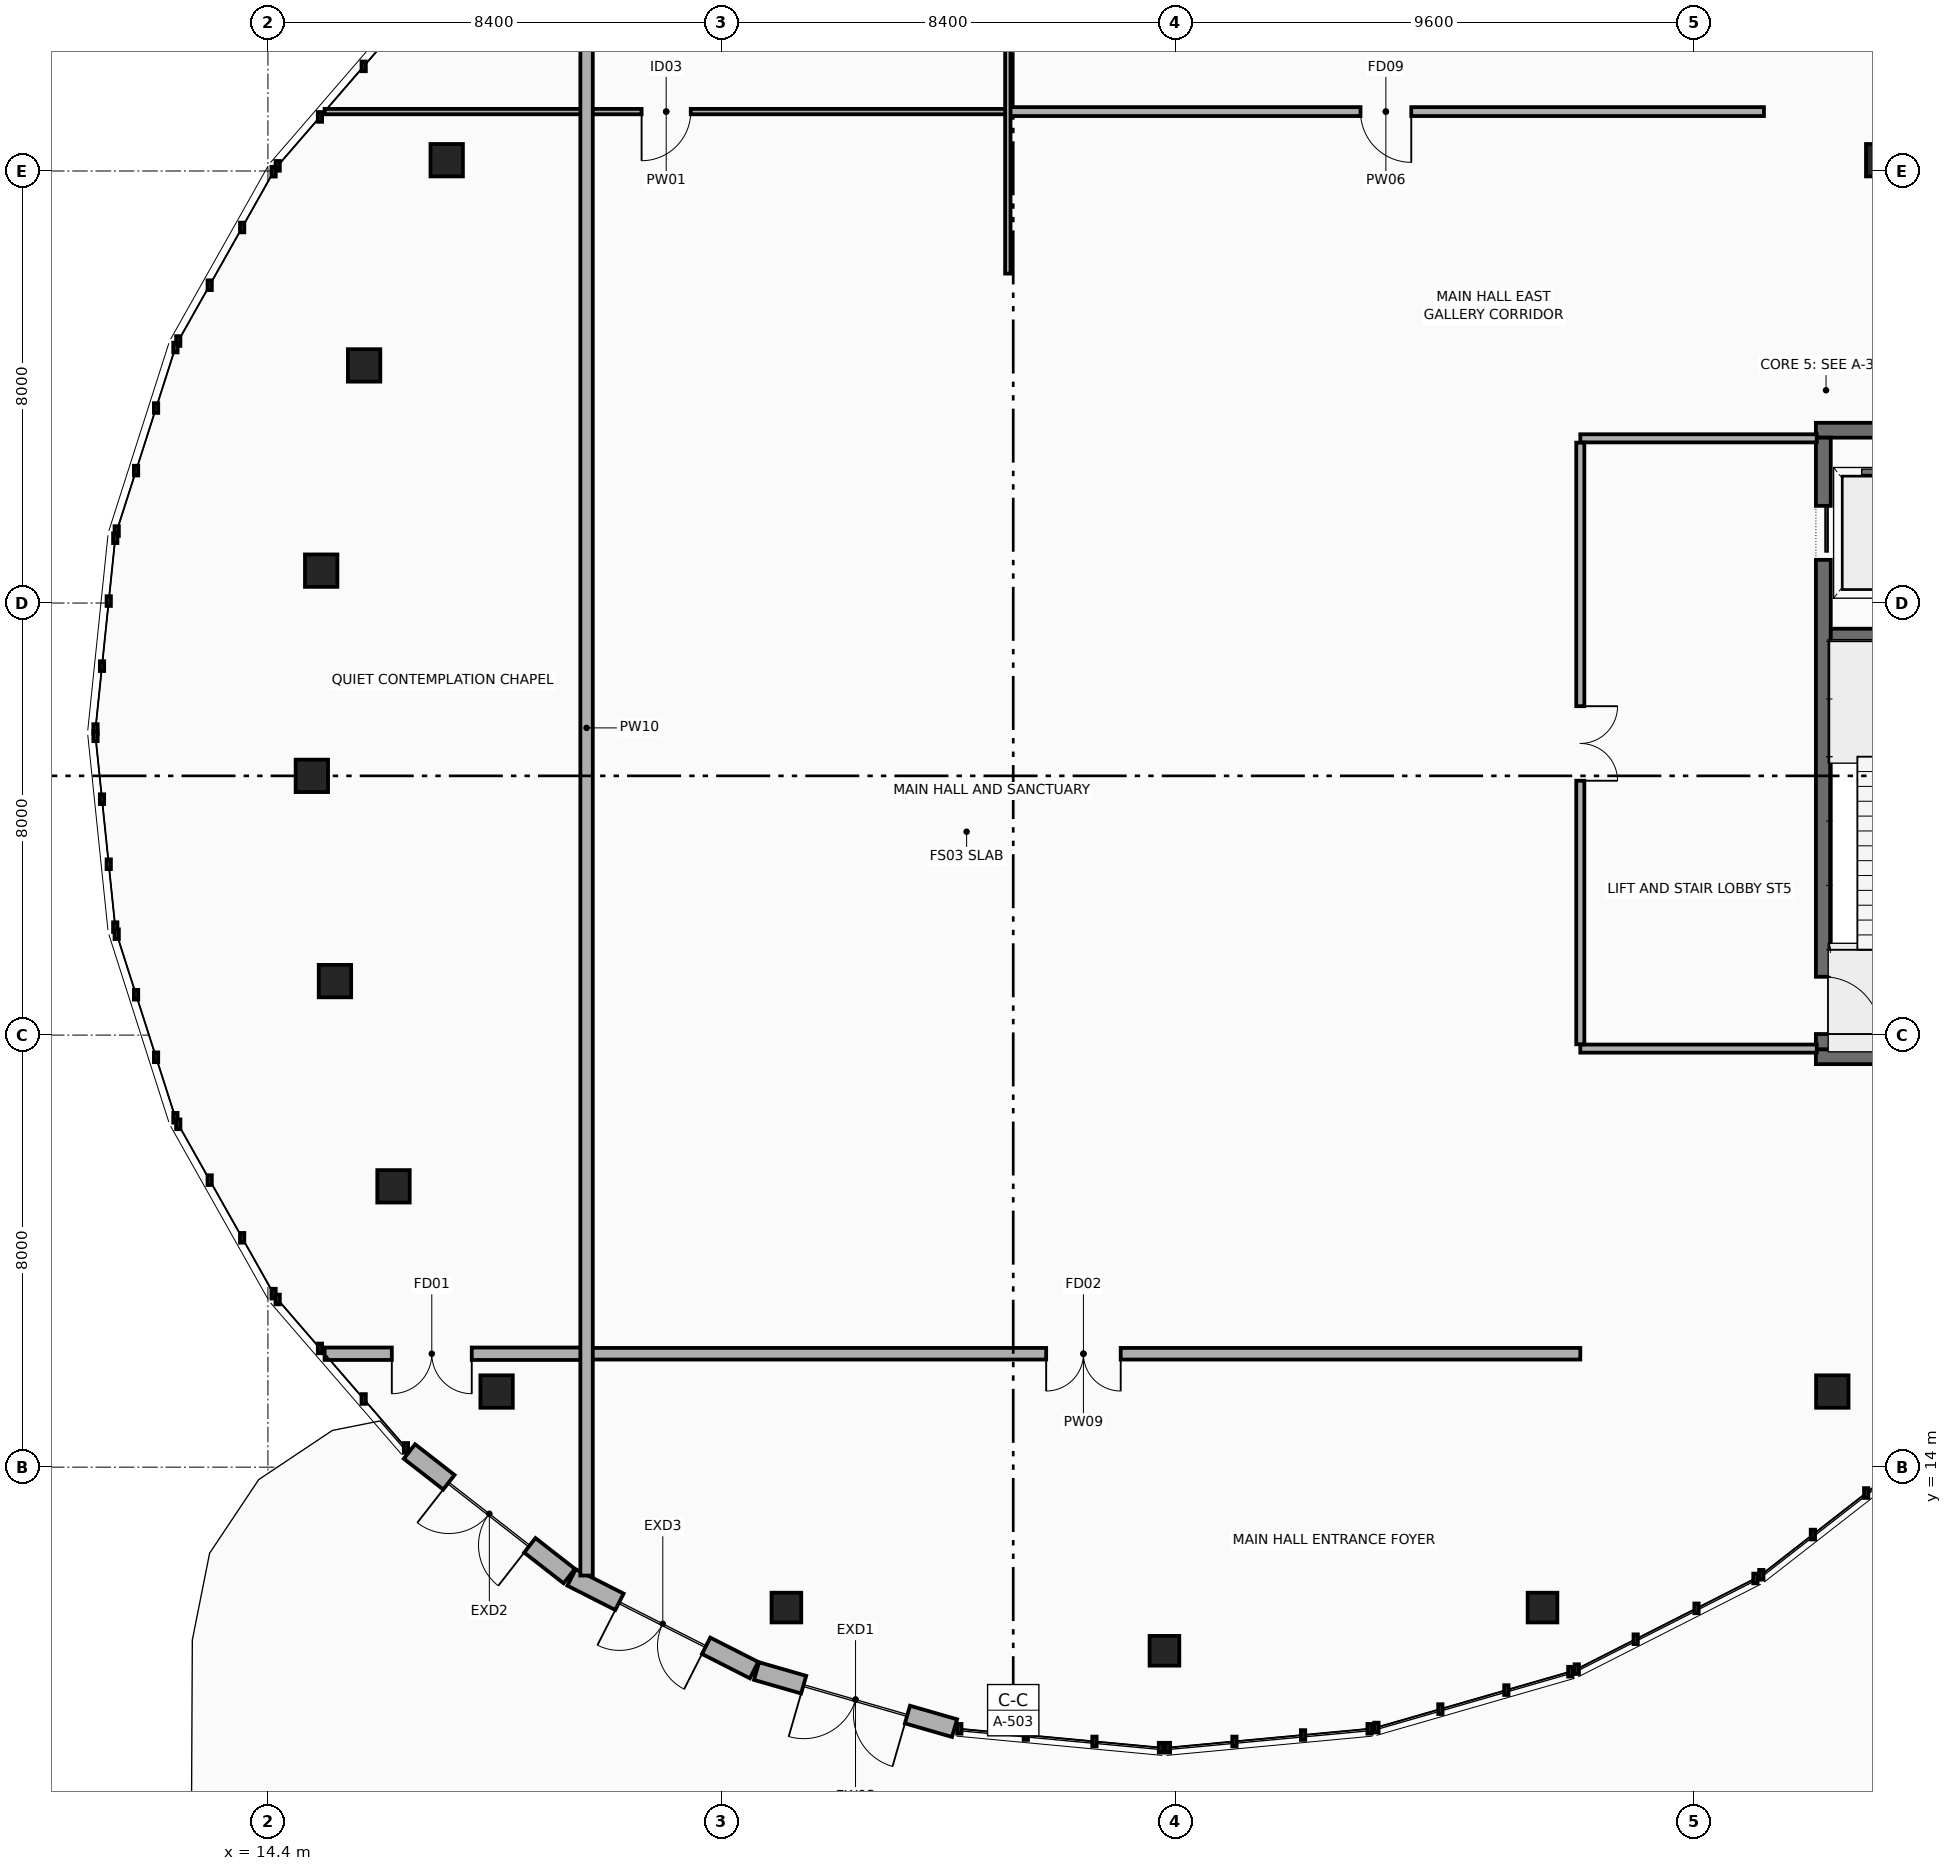
"""IFC4 building model, lengths in metres.
Left out: names, types, materials, properties, quantities, classifications, styles, units other than length and angle.
Written with IfcOpenShell. Run it as: python <this file> out.ifc"""

import sys

from ifc_helpers import new_model, si_unit, direction, frame, frame_2d, origin, origin_2d, place, context, subcontext, project, spatial, rectangle, extrude, element, fill, save


model = new_model("IFC4")
c1 = context("Model", 3, precision=1e-05, world=origin(), true_north=direction((0.0, 1.0)))
c2 = subcontext(c1, "Body", "Model", "MODEL_VIEW")
j1 = project(units=[si_unit("LENGTHUNIT", "METRE"), si_unit("PLANEANGLEUNIT", "RADIAN")], contexts=[c1])
p1 = place(None, origin())
s1 = spatial("IfcSite", under=j1, at=p1, CompositionType="ELEMENT")
p2 = place(p1, origin())
s2 = spatial("IfcBuilding", under=s1, at=p2, CompositionType="ELEMENT")
p3 = place(p2, origin())
s3 = spatial("IfcBuildingStorey", under=s2, at=p3, CompositionType="ELEMENT", Elevation=0.0)
for number, where, z_axis, x_axis in (
    (1, (43.062, 21.6, 0.0), (0.0, 0.0, 1.0), (1.0, 0.0, 0.0)),
    (2, (47.738, 33.2, 0.0), (0.0, 0.0, 1.0), (-1.0, 0.0, 0.0)),
):
    element("IfcWall", number, at=place(p3, frame(where, z_axis=z_axis, x_axis=x_axis)), inside=s3, PredefinedType="SHEAR", context=c2, shape_type="SweptSolid", body=[
        extrude(rectangle(XDim=4.676, YDim=0.275, at=frame_2d((2.338, 0.0))), origin(), (0.0, 0.0, 1.0), 4.8),
    ])
p4 = place(p3, frame((43.2, 33.062, 0.0), z_axis=(0.0, 0.0, 1.0), x_axis=(0.0, -1.0, 0.0)))
e3 = element("IfcWall", 3, at=p4, inside=s3, PredefinedType="SHEAR", context=c2, shape_type="SweptSolid", body=[
    extrude(rectangle(XDim=11.324, YDim=0.275, at=frame_2d((5.662, 0.0))), origin(), (0.0, 0.0, 1.0), 4.8),
])
p5 = place(p4, frame((1.262, 0.0, 0.0)))
e4 = element("IfcOpeningElement", 4, at=p5, cuts=e3, PredefinedType="OPENING", context=c2, shape_type="SweptSolid", body=[
    extrude(rectangle(XDim=1.0, YDim=2.15, at=frame_2d((0.5, 1.075))), frame((0.0, 0.147, 0.0), z_axis=(0.0, -1.0, 0.0), x_axis=(1.0, 0.0, 0.0)), (0.0, 0.0, 1.0), 0.295),
])
p6 = place(p4, frame((9.982, 0.0, 0.0)))
e5 = element("IfcOpeningElement", 5, at=p6, cuts=e3, PredefinedType="OPENING", context=c2, shape_type="SweptSolid", body=[
    extrude(rectangle(XDim=1.06, YDim=2.15, at=frame_2d((0.53, 1.075))), frame((0.0, 0.147, 0.0), z_axis=(0.0, -1.0, 0.0), x_axis=(1.0, 0.0, 0.0)), (0.0, 0.0, 1.0), 0.295),
])
p7 = place(p3, frame((43.338, 29.4, 0.0), z_axis=(0.0, 0.0, 1.0), x_axis=(1.0, 0.0, 0.0)))
e6 = element("IfcWall", 6, at=p7, inside=s3, PredefinedType="SHEAR", context=c2, shape_type="SweptSolid", body=[
    extrude(rectangle(XDim=4.124, YDim=0.25, at=frame_2d((2.062, 0.0))), origin(), (0.0, 0.0, 1.0), 4.8),
])
for number, where, z_axis, x_axis in (
    (7, (18.634, 15.4, 0.0), (0.0, 0.0, 1.0), (1.0, 0.0, 0.0)),
    (8, (43.366, 15.4, 0.0), (0.0, 0.0, 1.0), (1.0, 0.0, 0.0)),
    (9, (16.725, 19.2, 0.0), (0.0, 0.0, 1.0), (1.0, 0.0, 0.0)),
    (10, (15.641, 23.0, 0.0), (0.0, 0.0, 1.0), (1.0, 0.0, 0.0)),
    (11, (15.213, 26.8, 0.0), (0.0, 0.0, 1.0), (1.0, 0.0, 0.0)),
    (12, (15.386, 30.6, 0.0), (0.0, 0.0, 1.0), (1.0, 0.0, 0.0)),
    (13, (16.181, 34.4, 0.0), (0.0, 0.0, 1.0), (1.0, 0.0, 0.0)),
    (14, (17.71, 38.2, 0.0), (0.0, 0.0, 1.0), (1.0, 0.0, 0.0)),
    (15, (44.29, 38.2, 0.0), (0.0, 0.0, 1.0), (1.0, 0.0, 0.0)),
):
    element("IfcColumn", number, at=place(p3, frame(where, z_axis=z_axis, x_axis=x_axis)), inside=s3, PredefinedType="COLUMN", context=c2, shape_type="SweptSolid", body=[
        extrude(rectangle(XDim=0.6, YDim=0.6, at=origin_2d()), origin(), (0.0, 0.0, 1.0), 4.8),
    ])
for number, where, z_axis, x_axis in (
    (16, (24.0, 11.4, 0.0), (0.0, 0.0, 1.0), (1.0, 0.0, 0.0)),
    (17, (31.0, 10.6, 0.0), (0.0, 0.0, 1.0), (1.0, 0.0, 0.0)),
    (18, (38.0, 11.4, 0.0), (0.0, 0.0, 1.0), (1.0, 0.0, 0.0)),
):
    element("IfcColumn", number, at=place(p3, frame(where, z_axis=z_axis, x_axis=x_axis)), inside=s3, PredefinedType="COLUMN", context=c2, shape_type="SweptSolid", body=[
        extrude(rectangle(XDim=0.55, YDim=0.55, at=origin_2d()), origin(), (0.0, 0.0, 1.0), 4.8),
    ])
p8 = place(p3, frame((19.98, 11.983, 0.0), z_axis=(0.0, 0.0, 1.0), x_axis=(-0.78871426294, 0.614759962453, 0.0)))
e19 = element("IfcWall", 19, at=p8, inside=s3, PredefinedType="STANDARD", context=c2, shape_type="SweptSolid", body=[
    extrude(rectangle(XDim=3.753, YDim=0.34, at=frame_2d((1.876, 0.0))), origin(), (0.0, 0.0, 1.0), 4.04),
])
p9 = place(p8, frame((0.927, 0.0, 0.0)))
e20 = element("IfcOpeningElement", 20, at=p9, cuts=e19, PredefinedType="OPENING", context=c2, shape_type="SweptSolid", body=[
    extrude(rectangle(XDim=1.9, YDim=2.4, at=frame_2d((0.95, 1.2))), frame((0.0, 0.18, 0.0), z_axis=(0.0, -1.0, 0.0), x_axis=(1.0, 0.0, 0.0)), (0.0, 0.0, 1.0), 0.36),
])
p10 = place(p3, frame((23.401, 10.242, 0.0), z_axis=(0.0, 0.0, 1.0), x_axis=(-0.891704776389, 0.45261748946, 0.0)))
e21 = element("IfcWall", 21, at=p10, inside=s3, PredefinedType="STANDARD", context=c2, shape_type="SweptSolid", body=[
    extrude(rectangle(XDim=3.789, YDim=0.34, at=frame_2d((1.895, 0.0))), origin(), (0.0, 0.0, 1.0), 4.512),
])
p11 = place(p10, frame((0.995, 0.0, 0.0)))
e22 = element("IfcOpeningElement", 22, at=p11, cuts=e21, PredefinedType="OPENING", context=c2, shape_type="SweptSolid", body=[
    extrude(rectangle(XDim=1.8, YDim=2.35, at=frame_2d((0.9, 1.175))), frame((0.0, 0.18, 0.0), z_axis=(0.0, -1.0, 0.0), x_axis=(1.0, 0.0, 0.0)), (0.0, 0.0, 1.0), 0.36),
])
p12 = place(p3, frame((27.113, 9.168, 0.0), z_axis=(0.0, 0.0, 1.0), x_axis=(-0.960917919041, 0.27683343885, 0.0)))
e23 = element("IfcWall", 23, at=p12, inside=s3, PredefinedType="STANDARD", context=c2, shape_type="SweptSolid", body=[
    extrude(rectangle(XDim=3.815, YDim=0.34, at=frame_2d((1.908, 0.0))), origin(), (0.0, 0.0, 1.0), 4.04),
])
p13 = place(p12, frame((0.907, 0.0, 0.0)))
e24 = element("IfcOpeningElement", 24, at=p13, cuts=e23, PredefinedType="OPENING", context=c2, shape_type="SweptSolid", body=[
    extrude(rectangle(XDim=2.0, YDim=2.4, at=frame_2d((1.0, 1.2))), frame((0.0, 0.18, 0.0), z_axis=(0.0, -1.0, 0.0), x_axis=(1.0, 0.0, 0.0)), (0.0, 0.0, 1.0), 0.36),
])
for number, where, z_axis, x_axis in (
    (25, (38.7, 21.75, 0.0), (0.0, 0.0, 1.0), (1.0, 0.0, 0.0)),
    (26, (43.078, 33.05, 0.0), (0.0, 0.0, 1.0), (-1.0, 0.0, 0.0)),
):
    element("IfcWall", number, at=place(p3, frame(where, z_axis=z_axis, x_axis=x_axis)), inside=s3, PredefinedType="PARTITIONING", context=c2, shape_type="SweptSolid", body=[
        extrude(rectangle(XDim=4.378, YDim=0.15, at=frame_2d((2.189, 0.0))), origin(), (0.0, 0.0, 1.0), 4.512),
    ])
p14 = place(p3, frame((38.7, 32.97, 0.0), z_axis=(0.0, 0.0, 1.0), x_axis=(0.0, -1.0, 0.0)))
e27 = element("IfcWall", 27, at=p14, inside=s3, PredefinedType="PARTITIONING", context=c2, shape_type="SweptSolid", body=[
    extrude(rectangle(XDim=11.14, YDim=0.15, at=frame_2d((5.57, 0.0))), origin(), (0.0, 0.0, 1.0), 4.512),
])
p15 = place(p14, frame((4.88, 0.0, 0.0)))
e28 = element("IfcOpeningElement", 28, at=p15, cuts=e27, PredefinedType="OPENING", context=c2, shape_type="SweptSolid", body=[
    extrude(rectangle(XDim=1.38, YDim=2.2, at=frame_2d((0.69, 1.1))), frame((0.0, 0.085, 0.0), z_axis=(0.0, -1.0, 0.0), x_axis=(1.0, 0.0, 0.0)), (0.0, 0.0, 1.0), 0.17),
])
p16 = place(p3, frame((38.7, 16.1, 0.0), z_axis=(0.0, 0.0, 1.0), x_axis=(-1.0, 0.0, 0.0)))
e29 = element("IfcWall", 29, at=p16, inside=s3, PredefinedType="PARTITIONING", context=c2, shape_type="SweptSolid", body=[
    extrude(rectangle(XDim=18.4, YDim=0.215, at=frame_2d((9.2, 0.0))), origin(), (0.0, 0.0, 1.0), 4.512),
])
p17 = place(p16, frame((8.51, 0.0, 0.0)))
e30 = element("IfcOpeningElement", 30, at=p17, cuts=e29, PredefinedType="OPENING", context=c2, shape_type="SweptSolid", body=[
    extrude(rectangle(XDim=1.38, YDim=2.2, at=frame_2d((0.69, 1.1))), frame((0.0, 0.117, 0.0), z_axis=(0.0, -1.0, 0.0), x_axis=(1.0, 0.0, 0.0)), (0.0, 0.0, 1.0), 0.235),
])
p18 = place(p3, frame((20.3, 16.1, 0.0), z_axis=(0.0, 0.0, 1.0), x_axis=(-1.0, 0.0, 0.0)))
e31 = element("IfcWall", 31, at=p18, inside=s3, PredefinedType="PARTITIONING", context=c2, shape_type="SweptSolid", body=[
    extrude(rectangle(XDim=4.851, YDim=0.23, at=frame_2d((2.426, 0.0))), origin(), (0.0, 0.0, 1.0), 3.96),
])
p19 = place(p18, frame((2.126, 0.0, 0.0)))
e32 = element("IfcOpeningElement", 32, at=p19, cuts=e31, PredefinedType="OPENING", context=c2, shape_type="SweptSolid", body=[
    extrude(rectangle(XDim=1.48, YDim=2.22, at=frame_2d((0.74, 1.11))), frame((0.0, 0.125, 0.0), z_axis=(0.0, -1.0, 0.0), x_axis=(1.0, 0.0, 0.0)), (0.0, 0.0, 1.0), 0.25),
])
p20 = place(p3, frame((28.1, 39.1, 0.0), z_axis=(0.0, 0.0, 1.0), x_axis=(-1.0, 0.0, 0.0)))
e33 = element("IfcWall", 33, at=p20, inside=s3, PredefinedType="PARTITIONING", context=c2, shape_type="SweptSolid", body=[
    extrude(rectangle(XDim=12.651, YDim=0.1, at=frame_2d((6.326, 0.0))), origin(), (0.0, 0.0, 1.0), 3.96),
])
p21 = place(p20, frame((5.871, 0.0, 0.0)))
e34 = element("IfcOpeningElement", 34, at=p21, cuts=e33, PredefinedType="OPENING", context=c2, shape_type="SweptSolid", body=[
    extrude(rectangle(XDim=0.91, YDim=2.1, at=frame_2d((0.455, 1.05))), frame((0.0, 0.06, 0.0), z_axis=(0.0, -1.0, 0.0), x_axis=(1.0, 0.0, 0.0)), (0.0, 0.0, 1.0), 0.12),
])
p22 = place(p3, frame((42.1, 39.1, 0.0), z_axis=(0.0, 0.0, 1.0), x_axis=(-1.0, 0.0, 0.0)))
e35 = element("IfcWall", 35, at=p22, inside=s3, PredefinedType="PARTITIONING", context=c2, shape_type="SweptSolid", body=[
    extrude(rectangle(XDim=14.0, YDim=0.165, at=frame_2d((7.0, 0.0))), origin(), (0.0, 0.0, 1.0), 4.512),
])
p23 = place(p22, frame((6.53, 0.0, 0.0)))
e36 = element("IfcOpeningElement", 36, at=p23, cuts=e35, PredefinedType="OPENING", context=c2, shape_type="SweptSolid", body=[
    extrude(rectangle(XDim=0.94, YDim=2.1, at=frame_2d((0.47, 1.05))), frame((0.0, 0.093, 0.0), z_axis=(0.0, -1.0, 0.0), x_axis=(1.0, 0.0, 0.0)), (0.0, 0.0, 1.0), 0.185),
])
p24 = place(p3, frame((20.3, 11.993, 0.0), z_axis=(0.0, 0.0, 1.0), x_axis=(0.0, 1.0, 0.0)))
e37 = element("IfcWall", 37, at=p24, inside=s3, PredefinedType="PARTITIONING", context=c2, shape_type="SweptSolid", body=[
    extrude(rectangle(XDim=31.391, YDim=0.23, at=frame_2d((15.696, 0.0))), origin(), (0.0, 0.0, 1.0), 3.96),
])
p25 = place(p3, frame((28.1, 36.1, 0.0), z_axis=(0.0, 0.0, 1.0), x_axis=(0.0, 1.0, 0.0)))
e38 = element("IfcWall", 38, at=p25, inside=s3, PredefinedType="PARTITIONING", context=c2, shape_type="SweptSolid", body=[
    extrude(rectangle(XDim=10.029, YDim=0.1, at=frame_2d((5.014, 0.0))), origin(), (0.0, 0.0, 1.0), 3.96),
])
p26 = place(p9, origin())
e39 = element("IfcDoor", 39, at=p26, inside=s3, OperationType="DOUBLE_DOOR_SINGLE_SWING", PredefinedType="DOOR", context=c2, shape_type="SweptSolid", body=[
    extrude(rectangle(XDim=1.9, YDim=2.4, at=frame_2d((0.95, 1.2))), frame((0.0, 0.025, 0.0), z_axis=(0.0, -1.0, 0.0), x_axis=(1.0, 0.0, 0.0)), (0.0, 0.0, 1.0), 0.05),
])
fill(e20, e39)
p27 = place(p11, origin())
e40 = element("IfcDoor", 40, at=p27, inside=s3, OperationType="DOUBLE_DOOR_SINGLE_SWING", PredefinedType="DOOR", context=c2, shape_type="SweptSolid", body=[
    extrude(rectangle(XDim=1.8, YDim=2.35, at=frame_2d((0.9, 1.175))), frame((0.0, 0.025, 0.0), z_axis=(0.0, -1.0, 0.0), x_axis=(1.0, 0.0, 0.0)), (0.0, 0.0, 1.0), 0.05),
])
fill(e22, e40)
p28 = place(p13, origin())
e41 = element("IfcDoor", 41, at=p28, inside=s3, OperationType="DOUBLE_DOOR_SINGLE_SWING", PredefinedType="DOOR", context=c2, shape_type="SweptSolid", body=[
    extrude(rectangle(XDim=2.0, YDim=2.4, at=frame_2d((1.0, 1.2))), frame((0.0, 0.025, 0.0), z_axis=(0.0, -1.0, 0.0), x_axis=(1.0, 0.0, 0.0)), (0.0, 0.0, 1.0), 0.05),
])
fill(e24, e41)
p29 = place(p5, origin())
e42 = element("IfcDoor", 42, at=p29, inside=s3, OperationType="SLIDING_TO_LEFT", PredefinedType="DOOR", context=c2, shape_type="SweptSolid", body=[
    extrude(rectangle(XDim=1.0, YDim=2.15, at=frame_2d((0.5, 1.075))), frame((0.0, 0.025, 0.0), z_axis=(0.0, -1.0, 0.0), x_axis=(1.0, 0.0, 0.0)), (0.0, 0.0, 1.0), 0.05),
])
fill(e4, e42)
p30 = place(p6, origin())
e43 = element("IfcDoor", 43, at=p30, inside=s3, OperationType="SINGLE_SWING_RIGHT", PredefinedType="DOOR", context=c2, shape_type="SweptSolid", body=[
    extrude(rectangle(XDim=1.06, YDim=2.15, at=frame_2d((0.53, 1.075))), frame((0.0, 0.025, 0.0), z_axis=(0.0, -1.0, 0.0), x_axis=(1.0, 0.0, 0.0)), (0.0, 0.0, 1.0), 0.05),
])
fill(e5, e43)
p31 = place(p15, origin())
e44 = element("IfcDoor", 44, at=p31, inside=s3, OperationType="DOUBLE_DOOR_SINGLE_SWING", PredefinedType="DOOR", context=c2, shape_type="SweptSolid", body=[
    extrude(rectangle(XDim=1.38, YDim=2.2, at=frame_2d((0.69, 1.1))), frame((0.0, 0.025, 0.0), z_axis=(0.0, -1.0, 0.0), x_axis=(1.0, 0.0, 0.0)), (0.0, 0.0, 1.0), 0.05),
])
fill(e28, e44)
p32 = place(p17, origin())
e45 = element("IfcDoor", 45, at=p32, inside=s3, OperationType="DOUBLE_DOOR_SINGLE_SWING", PredefinedType="DOOR", context=c2, shape_type="SweptSolid", body=[
    extrude(rectangle(XDim=1.38, YDim=2.2, at=frame_2d((0.69, 1.1))), frame((0.0, 0.025, 0.0), z_axis=(0.0, -1.0, 0.0), x_axis=(1.0, 0.0, 0.0)), (0.0, 0.0, 1.0), 0.05),
])
fill(e30, e45)
p33 = place(p19, origin())
e46 = element("IfcDoor", 46, at=p33, inside=s3, OperationType="DOUBLE_DOOR_SINGLE_SWING", PredefinedType="DOOR", context=c2, shape_type="SweptSolid", body=[
    extrude(rectangle(XDim=1.48, YDim=2.22, at=frame_2d((0.74, 1.11))), frame((0.0, 0.025, 0.0), z_axis=(0.0, -1.0, 0.0), x_axis=(1.0, 0.0, 0.0)), (0.0, 0.0, 1.0), 0.05),
])
fill(e32, e46)
p34 = place(p21, origin())
e47 = element("IfcDoor", 47, at=p34, inside=s3, OperationType="SINGLE_SWING_RIGHT", PredefinedType="DOOR", context=c2, shape_type="SweptSolid", body=[
    extrude(rectangle(XDim=0.91, YDim=2.1, at=frame_2d((0.455, 1.05))), frame((0.0, 0.025, 0.0), z_axis=(0.0, -1.0, 0.0), x_axis=(1.0, 0.0, 0.0)), (0.0, 0.0, 1.0), 0.05),
])
fill(e34, e47)
p35 = place(p23, origin())
e48 = element("IfcDoor", 48, at=p35, inside=s3, OperationType="SINGLE_SWING_LEFT", PredefinedType="DOOR", context=c2, shape_type="SweptSolid", body=[
    extrude(rectangle(XDim=0.94, YDim=2.1, at=frame_2d((0.47, 1.05))), frame((0.0, 0.025, 0.0), z_axis=(0.0, -1.0, 0.0), x_axis=(1.0, 0.0, 0.0)), (0.0, 0.0, 1.0), 0.05),
])
fill(e36, e48)
save(model, sys.argv[1])
